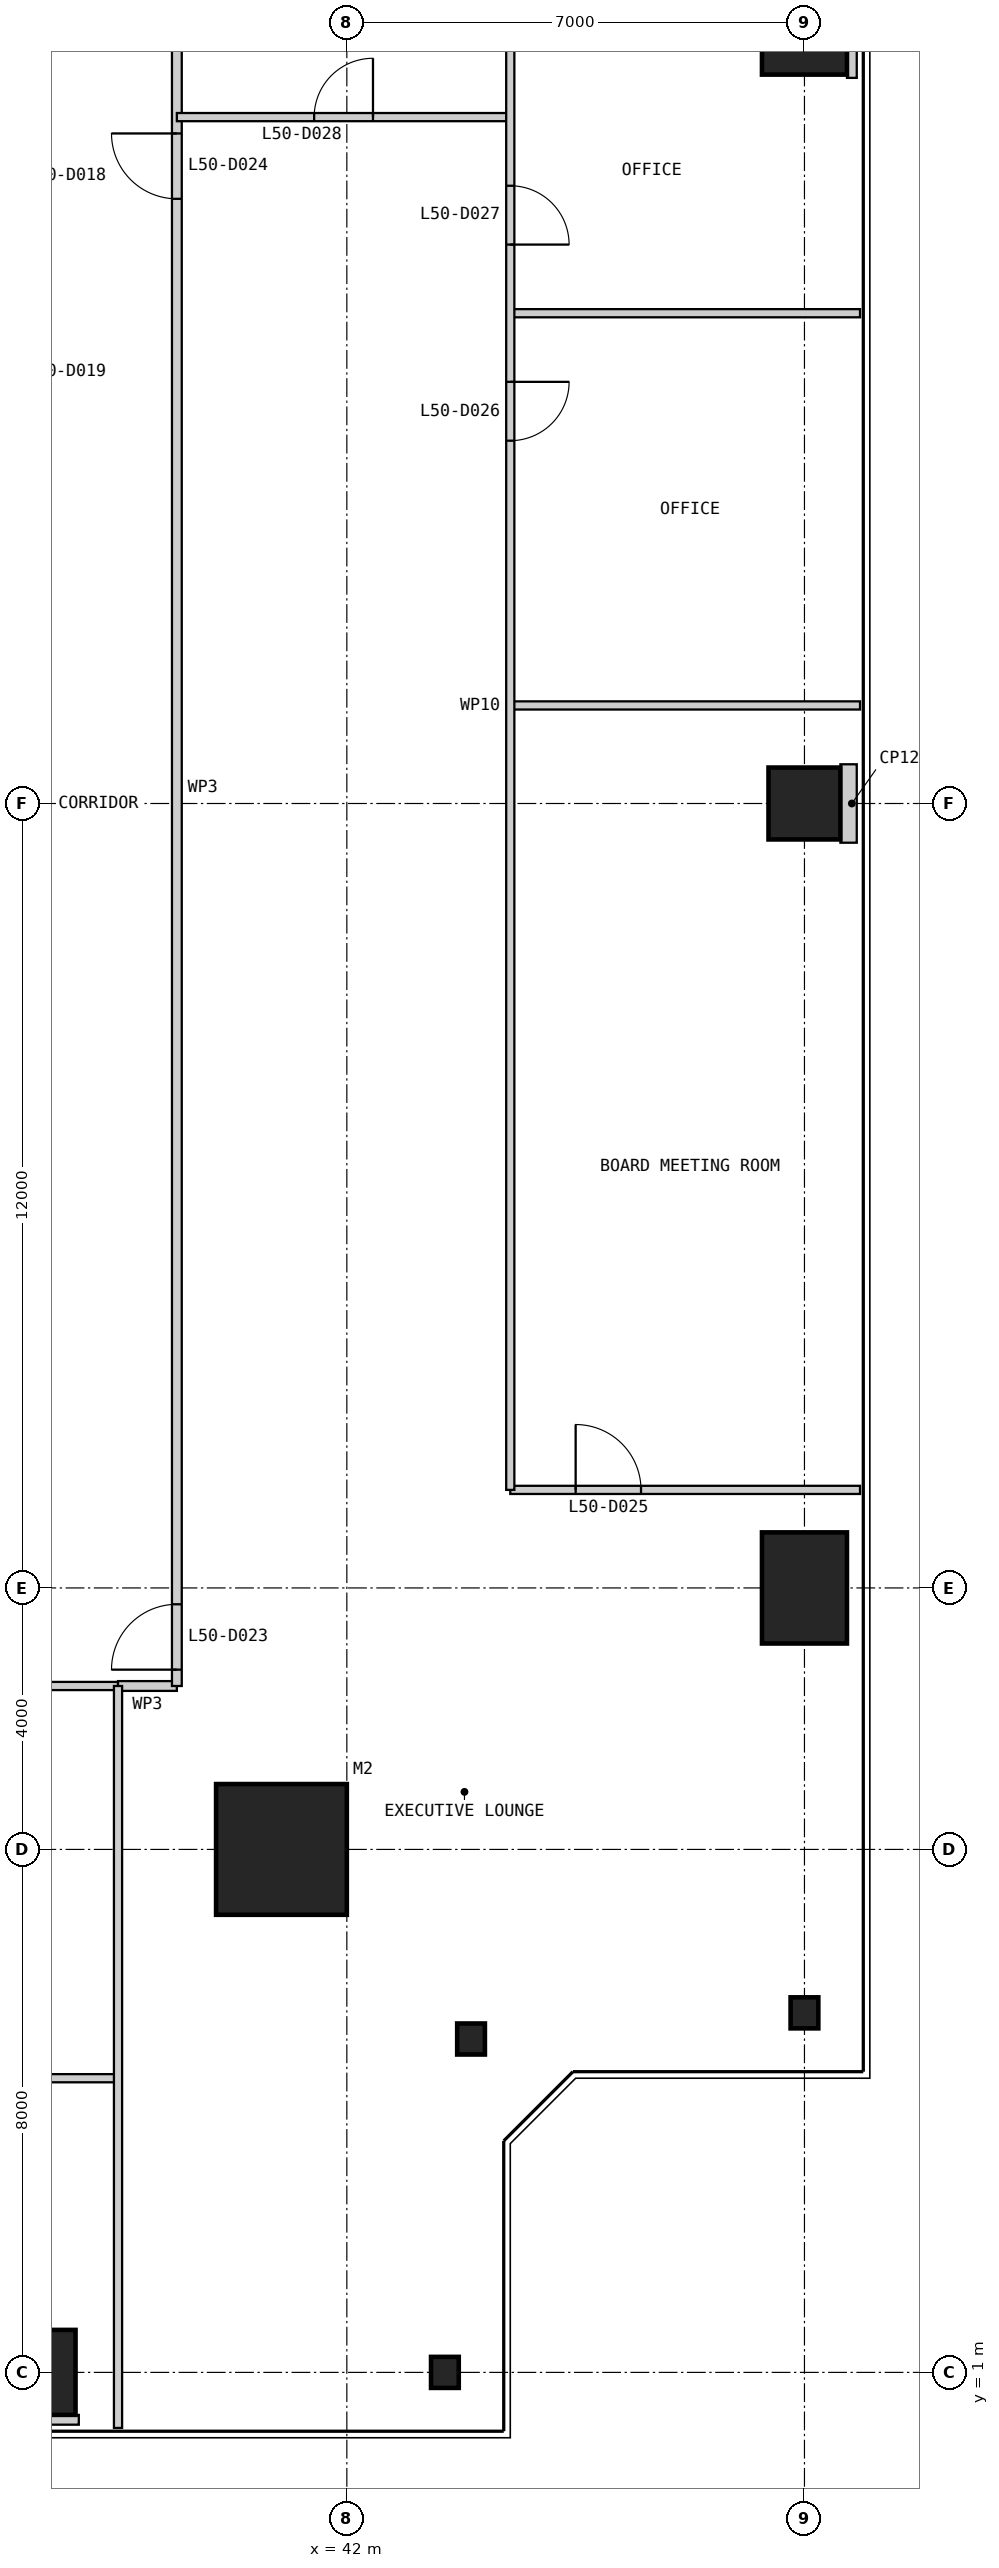
"""IFC4 building model, lengths in metres.
Left out: names, types, materials, properties, quantities, classifications, styles, units other than length and angle.
Written with IfcOpenShell. Run it as: python <this file> out.ifc"""

import sys

from ifc_helpers import new_model, si_unit, direction, frame, frame_2d, origin, origin_2d, place, context, subcontext, project, spatial, rectangle, i_section, extrude, element, fill, save


model = new_model("IFC4")
c1 = context("Model", 3, precision=1e-05, world=origin(), true_north=direction((0.0, 1.0)))
c2 = subcontext(c1, "Body", "Model", "MODEL_VIEW")
j1 = project(units=[si_unit("LENGTHUNIT", "METRE"), si_unit("PLANEANGLEUNIT", "RADIAN")], contexts=[c1])
p1 = place(None, origin())
s1 = spatial("IfcSite", under=j1, at=p1, CompositionType="ELEMENT")
p2 = place(p1, origin())
s2 = spatial("IfcBuilding", under=s1, at=p2, CompositionType="ELEMENT")
p3 = place(p2, frame((0.0, 0.0, 213.8)))
s3 = spatial("IfcBuildingStorey", under=s2, at=p3, CompositionType="ELEMENT", Elevation=213.8)
p4 = place(p3, frame((41.0, 9.0, 0.0), z_axis=(0.0, 0.0, 1.0), x_axis=(1.0, 0.0, 0.0)))
e1 = element("IfcColumn", 1, at=p4, inside=s3, PredefinedType="COLUMN", context=c2, shape_type="SweptSolid", body=[
    extrude(rectangle(XDim=2.0, YDim=2.0, at=origin_2d()), origin(), (0.0, 0.0, 1.0), 4.0),
])
p5 = place(p3, frame((37.0, 1.0, 0.0), z_axis=(0.0, 0.0, 1.0), x_axis=(1.0, 0.0, 0.0)))
e2 = element("IfcColumn", 2, at=p5, inside=s3, PredefinedType="COLUMN", context=c2, shape_type="SweptSolid", body=[
    extrude(rectangle(XDim=1.7, YDim=1.3, at=origin_2d()), origin(), (0.0, 0.0, 1.0), 4.0),
])
for number, where, z_axis, x_axis in (
    (3, (43.5, 1.0, 0.0), (0.0, 0.0, 1.0), (1.0, 0.0, 0.0)),
    (4, (43.9, 6.1, 0.0), (0.0, 0.0, 1.0), (1.0, 0.0, 0.0)),
    (5, (49.0, 6.5, 0.0), (0.0, 0.0, 1.0), (1.0, 0.0, 0.0)),
):
    element("IfcColumn", number, at=place(p3, frame(where, z_axis=z_axis, x_axis=x_axis)), inside=s3, PredefinedType="COLUMN", context=c2, shape_type="SweptSolid", body=[
        extrude(i_section(OverallWidth=0.424, OverallDepth=0.475, WebThickness=0.048, FlangeThickness=0.077, at=origin_2d()), origin(), (0.0, 0.0, 1.0), 4.0),
    ])
p6 = place(p3, frame((49.0, 13.0, 0.0), z_axis=(0.0, 0.0, 1.0), x_axis=(1.0, 0.0, 0.0)))
e6 = element("IfcColumn", 6, at=p6, inside=s3, PredefinedType="COLUMN", context=c2, shape_type="SweptSolid", body=[
    extrude(rectangle(XDim=1.3, YDim=1.7, at=origin_2d()), origin(), (0.0, 0.0, 1.0), 4.0),
])
p7 = place(p3, frame((49.0, 25.0, 0.0), z_axis=(0.0, 0.0, 1.0), x_axis=(1.0, 0.0, 0.0)))
e7 = element("IfcColumn", 7, at=p7, inside=s3, PredefinedType="COLUMN", context=c2, shape_type="SweptSolid", body=[
    extrude(rectangle(XDim=1.1, YDim=1.1, at=origin_2d()), origin(), (0.0, 0.0, 1.0), 4.0),
])
p8 = place(p3, frame((49.0, 37.0, 0.0), z_axis=(0.0, 0.0, 1.0), x_axis=(1.0, 0.0, 0.0)))
e8 = element("IfcColumn", 8, at=p8, inside=s3, PredefinedType="COLUMN", context=c2, shape_type="SweptSolid", body=[
    extrude(rectangle(XDim=1.3, YDim=1.7, at=origin_2d()), origin(), (0.0, 0.0, 1.0), 4.0),
])
p9 = place(p3, frame((32.5, 5.5, 0.0), z_axis=(0.0, 0.0, 1.0), x_axis=(1.0, 0.0, 0.0)))
e9 = element("IfcWall", 9, at=p9, inside=s3, PredefinedType="PARTITIONING", context=c2, shape_type="SweptSolid", body=[
    extrude(rectangle(XDim=6.0, YDim=0.125, at=frame_2d((3.0, 0.0))), origin(), (0.0, 0.0, 1.0), 3.85),
])
p10 = place(p3, frame((35.5, 11.5, 0.0), z_axis=(0.0, 0.0, 1.0), x_axis=(1.0, 0.0, 0.0)))
e10 = element("IfcWall", 10, at=p10, inside=s3, PredefinedType="PARTITIONING", context=c2, shape_type="SweptSolid", body=[
    extrude(rectangle(XDim=3.0, YDim=0.125, at=frame_2d((1.5, 0.0))), origin(), (0.0, 0.0, 1.0), 3.85),
])
p11 = place(p3, frame((38.5, 11.5, 0.0), z_axis=(0.0, 0.0, 1.0), x_axis=(1.0, 0.0, 0.0)))
e11 = element("IfcWall", 11, at=p11, inside=s3, PredefinedType="PARTITIONING", context=c2, shape_type="SweptSolid", body=[
    extrude(rectangle(XDim=0.9, YDim=0.15, at=frame_2d((0.45, 0.0))), origin(), (0.0, 0.0, 1.0), 3.85),
])
p12 = place(p3, frame((39.4, 11.5, 0.0), z_axis=(0.0, 0.0, 1.0), x_axis=(0.0, 1.0, 0.0)))
e12 = element("IfcWall", 12, at=p12, inside=s3, PredefinedType="PARTITIONING", context=c2, shape_type="SweptSolid", body=[
    extrude(rectangle(XDim=27.0, YDim=0.15, at=frame_2d((13.5, 0.0))), origin(), (0.0, 0.0, 1.0), 3.85),
])
p13 = place(p12, frame((0.25, 0.0, 0.0)))
e13 = element("IfcOpeningElement", 13, at=p13, cuts=e12, PredefinedType="OPENING", context=c2, shape_type="SweptSolid", body=[
    extrude(rectangle(XDim=1.0, YDim=2.2, at=frame_2d((0.5, 1.1))), frame((0.0, 0.085, 0.0), z_axis=(0.0, -1.0, 0.0), x_axis=(1.0, 0.0, 0.0)), (0.0, 0.0, 1.0), 0.17),
])
p14 = place(p12, frame((22.75, 0.0, 0.0)))
e14 = element("IfcOpeningElement", 14, at=p14, cuts=e12, PredefinedType="OPENING", context=c2, shape_type="SweptSolid", body=[
    extrude(rectangle(XDim=1.0, YDim=2.2, at=frame_2d((0.5, 1.1))), frame((0.0, 0.085, 0.0), z_axis=(0.0, -1.0, 0.0), x_axis=(1.0, 0.0, 0.0)), (0.0, 0.0, 1.0), 0.17),
])
p15 = place(p3, frame((38.5, 0.15, 0.0), z_axis=(0.0, 0.0, 1.0), x_axis=(0.0, 1.0, 0.0)))
e15 = element("IfcWall", 15, at=p15, inside=s3, PredefinedType="PARTITIONING", context=c2, shape_type="SweptSolid", body=[
    extrude(rectangle(XDim=11.35, YDim=0.125, at=frame_2d((5.675, 0.0))), origin(), (0.0, 0.0, 1.0), 3.85),
])
p16 = place(p3, frame((49.85, 14.5, 0.0), z_axis=(0.0, 0.0, 1.0), x_axis=(-1.0, 0.0, 0.0)))
e16 = element("IfcWall", 16, at=p16, inside=s3, PredefinedType="PARTITIONING", context=c2, shape_type="SweptSolid", body=[
    extrude(rectangle(XDim=5.35, YDim=0.125, at=frame_2d((2.675, 0.0))), origin(), (0.0, 0.0, 1.0), 3.85),
])
p17 = place(p16, frame((3.35, 0.0, 0.0)))
e17 = element("IfcOpeningElement", 17, at=p17, cuts=e16, PredefinedType="OPENING", context=c2, shape_type="SweptSolid", body=[
    extrude(rectangle(XDim=1.0, YDim=2.2, at=frame_2d((0.5, 1.1))), frame((0.0, 0.073, 0.0), z_axis=(0.0, -1.0, 0.0), x_axis=(1.0, 0.0, 0.0)), (0.0, 0.0, 1.0), 0.145),
])
for number, where, z_axis, x_axis in (
    (18, (49.85, 26.5, 0.0), (0.0, 0.0, 1.0), (-1.0, 0.0, 0.0)),
    (19, (49.85, 32.5, 0.0), (0.0, 0.0, 1.0), (-1.0, 0.0, 0.0)),
):
    element("IfcWall", number, at=place(p3, frame(where, z_axis=z_axis, x_axis=x_axis)), inside=s3, PredefinedType="PARTITIONING", context=c2, shape_type="SweptSolid", body=[
        extrude(rectangle(XDim=5.35, YDim=0.125, at=frame_2d((2.675, 0.0))), origin(), (0.0, 0.0, 1.0), 3.85),
    ])
p18 = place(p3, frame((44.5, 35.5, 0.0), z_axis=(0.0, 0.0, 1.0), x_axis=(-1.0, 0.0, 0.0)))
e20 = element("IfcWall", 20, at=p18, inside=s3, PredefinedType="PARTITIONING", context=c2, shape_type="SweptSolid", body=[
    extrude(rectangle(XDim=5.1, YDim=0.125, at=frame_2d((2.55, 0.0))), origin(), (0.0, 0.0, 1.0), 3.85),
])
p19 = place(p18, frame((2.1, 0.0, 0.0)))
e21 = element("IfcOpeningElement", 21, at=p19, cuts=e20, PredefinedType="OPENING", context=c2, shape_type="SweptSolid", body=[
    extrude(rectangle(XDim=0.9, YDim=2.2, at=frame_2d((0.45, 1.1))), frame((0.0, 0.073, 0.0), z_axis=(0.0, -1.0, 0.0), x_axis=(1.0, 0.0, 0.0)), (0.0, 0.0, 1.0), 0.145),
])
p20 = place(p3, frame((44.5, 14.5, 0.0), z_axis=(0.0, 0.0, 1.0), x_axis=(0.0, 1.0, 0.0)))
e22 = element("IfcWall", 22, at=p20, inside=s3, PredefinedType="PARTITIONING", context=c2, shape_type="SweptSolid", body=[
    extrude(rectangle(XDim=24.0, YDim=0.125, at=frame_2d((12.0, 0.0))), origin(), (0.0, 0.0, 1.0), 3.85),
])
p21 = place(p20, frame((16.05, 0.0, 0.0)))
e23 = element("IfcOpeningElement", 23, at=p21, cuts=e22, PredefinedType="OPENING", context=c2, shape_type="SweptSolid", body=[
    extrude(rectangle(XDim=0.9, YDim=2.2, at=frame_2d((0.45, 1.1))), frame((0.0, 0.073, 0.0), z_axis=(0.0, -1.0, 0.0), x_axis=(1.0, 0.0, 0.0)), (0.0, 0.0, 1.0), 0.145),
])
p22 = place(p20, frame((19.05, 0.0, 0.0)))
e24 = element("IfcOpeningElement", 24, at=p22, cuts=e22, PredefinedType="OPENING", context=c2, shape_type="SweptSolid", body=[
    extrude(rectangle(XDim=0.9, YDim=2.2, at=frame_2d((0.45, 1.1))), frame((0.0, 0.073, 0.0), z_axis=(0.0, -1.0, 0.0), x_axis=(1.0, 0.0, 0.0)), (0.0, 0.0, 1.0), 0.145),
])
p23 = place(p3, frame((37.0, 0.2, 0.0), z_axis=(0.0, 0.0, 1.0), x_axis=(0.0, 1.0, 0.0)))
e25 = element("IfcWall", 25, at=p23, inside=s3, PredefinedType="PARTITIONING", context=c2, shape_type="SweptSolid", body=[
    extrude(rectangle(XDim=0.15, YDim=1.8, at=frame_2d((0.075, 0.0))), origin(), (0.0, 0.0, 1.0), 3.85),
])
p24 = place(p3, frame((49.8, 25.0, 0.0), z_axis=(0.0, 0.0, 1.0), x_axis=(-1.0, 0.0, 0.0)))
e26 = element("IfcWall", 26, at=p24, inside=s3, PredefinedType="PARTITIONING", context=c2, shape_type="SweptSolid", body=[
    extrude(rectangle(XDim=0.25, YDim=1.2, at=frame_2d((0.125, 0.0))), origin(), (0.0, 0.0, 1.0), 3.85),
])
p25 = place(p3, frame((49.8, 37.0, 0.0), z_axis=(0.0, 0.0, 1.0), x_axis=(-1.0, 0.0, 0.0)))
e27 = element("IfcWall", 27, at=p25, inside=s3, PredefinedType="PARTITIONING", context=c2, shape_type="SweptSolid", body=[
    extrude(rectangle(XDim=0.15, YDim=1.8, at=frame_2d((0.075, 0.0))), origin(), (0.0, 0.0, 1.0), 3.85),
])
p26 = place(p13, origin())
e28 = element("IfcDoor", 28, at=p26, inside=s3, OperationType="SINGLE_SWING_LEFT", PredefinedType="DOOR", context=c2, shape_type="SweptSolid", body=[
    extrude(rectangle(XDim=1.0, YDim=2.2, at=frame_2d((0.5, 1.1))), frame((0.0, 0.025, 0.0), z_axis=(0.0, -1.0, 0.0), x_axis=(1.0, 0.0, 0.0)), (0.0, 0.0, 1.0), 0.05),
])
fill(e13, e28)
p27 = place(p14, origin())
e29 = element("IfcDoor", 29, at=p27, inside=s3, OperationType="SINGLE_SWING_RIGHT", PredefinedType="DOOR", context=c2, shape_type="SweptSolid", body=[
    extrude(rectangle(XDim=1.0, YDim=2.2, at=frame_2d((0.5, 1.1))), frame((0.0, 0.025, 0.0), z_axis=(0.0, -1.0, 0.0), x_axis=(1.0, 0.0, 0.0)), (0.0, 0.0, 1.0), 0.05),
])
fill(e14, e29)
p28 = place(p17, frame((1.0, 0.0, 0.0), z_axis=(0.0, 0.0, 1.0), x_axis=(-1.0, 0.0, 0.0)))
e30 = element("IfcDoor", 30, at=p28, inside=s3, OperationType="SINGLE_SWING_LEFT", PredefinedType="DOOR", context=c2, shape_type="SweptSolid", body=[
    extrude(rectangle(XDim=1.0, YDim=2.2, at=frame_2d((0.5, 1.1))), frame((0.0, 0.025, 0.0), z_axis=(0.0, -1.0, 0.0), x_axis=(1.0, 0.0, 0.0)), (0.0, 0.0, 1.0), 0.05),
])
fill(e17, e30)
p29 = place(p21, frame((0.9, 0.0, 0.0), z_axis=(0.0, 0.0, 1.0), x_axis=(-1.0, 0.0, 0.0)))
e31 = element("IfcDoor", 31, at=p29, inside=s3, OperationType="SINGLE_SWING_LEFT", PredefinedType="DOOR", context=c2, shape_type="SweptSolid", body=[
    extrude(rectangle(XDim=0.9, YDim=2.2, at=frame_2d((0.45, 1.1))), frame((0.0, 0.025, 0.0), z_axis=(0.0, -1.0, 0.0), x_axis=(1.0, 0.0, 0.0)), (0.0, 0.0, 1.0), 0.05),
])
fill(e23, e31)
p30 = place(p22, frame((0.9, 0.0, 0.0), z_axis=(0.0, 0.0, 1.0), x_axis=(-1.0, 0.0, 0.0)))
e32 = element("IfcDoor", 32, at=p30, inside=s3, OperationType="SINGLE_SWING_RIGHT", PredefinedType="DOOR", context=c2, shape_type="SweptSolid", body=[
    extrude(rectangle(XDim=0.9, YDim=2.2, at=frame_2d((0.45, 1.1))), frame((0.0, 0.025, 0.0), z_axis=(0.0, -1.0, 0.0), x_axis=(1.0, 0.0, 0.0)), (0.0, 0.0, 1.0), 0.05),
])
fill(e24, e32)
p31 = place(p19, frame((0.9, 0.0, 0.0), z_axis=(0.0, 0.0, 1.0), x_axis=(-1.0, 0.0, 0.0)))
e33 = element("IfcDoor", 33, at=p31, inside=s3, OperationType="SINGLE_SWING_RIGHT", PredefinedType="DOOR", context=c2, shape_type="SweptSolid", body=[
    extrude(rectangle(XDim=0.9, YDim=2.2, at=frame_2d((0.45, 1.1))), frame((0.0, 0.025, 0.0), z_axis=(0.0, -1.0, 0.0), x_axis=(1.0, 0.0, 0.0)), (0.0, 0.0, 1.0), 0.05),
])
fill(e21, e33)
save(model, sys.argv[1])
